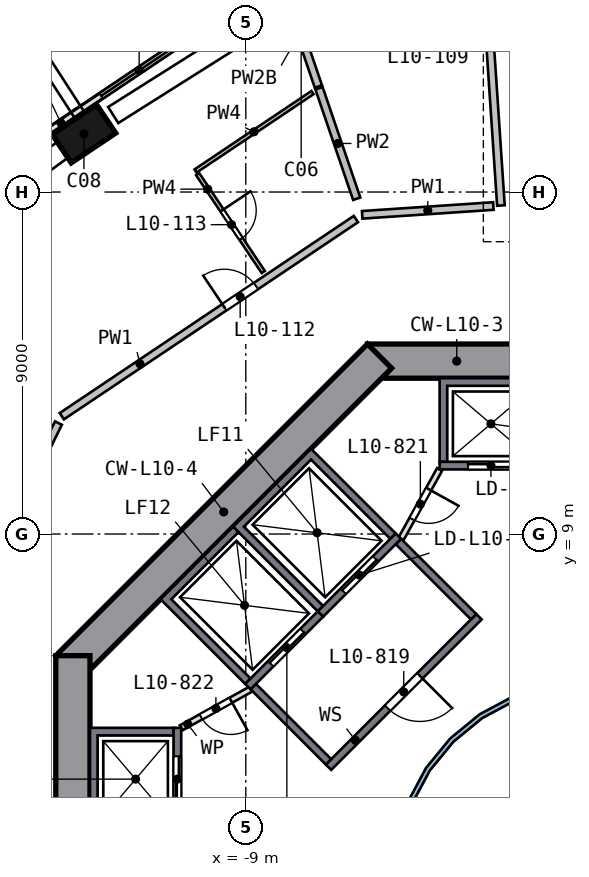
"""IFC4 building model, lengths in metres.
Left out: names, types, materials, properties, quantities, classifications, styles, units other than length and angle.
Written with IfcOpenShell. Run it as: python <this file> out.ifc"""

import sys

from ifc_helpers import new_model, si_unit, direction, frame, frame_2d, origin, origin_2d, place, context, subcontext, project, spatial, polyline, rectangle, outline, extrude, element, fill, save


model = new_model("IFC4")
c1 = context("Model", 3, precision=1e-05, world=origin(), true_north=direction((0.0, 1.0)))
c2 = subcontext(c1, "Body", "Model", "MODEL_VIEW")
j1 = project(units=[si_unit("LENGTHUNIT", "METRE"), si_unit("PLANEANGLEUNIT", "RADIAN")], contexts=[c1])
p1 = place(None, origin())
s1 = spatial("IfcSite", under=j1, at=p1, CompositionType="ELEMENT")
p2 = place(p1, origin())
s2 = spatial("IfcBuilding", under=s1, at=p2, CompositionType="ELEMENT")
p3 = place(p2, frame((0.0, 0.0, 49.5)))
s3 = spatial("IfcBuildingStorey", under=s2, at=p3, CompositionType="ELEMENT", Elevation=49.5)
p4 = place(p3, frame((-13.147, 19.609, 0.0), z_axis=(-0.092706042, -0.063274346, 0.993681009), x_axis=(-0.825459696, -0.553189961, -0.112237059)))
e1 = element("IfcColumn", 1, at=p4, inside=s3, PredefinedType="COLUMN", context=c2, shape_type="SweptSolid", body=[
    extrude(rectangle(XDim=1.4, YDim=0.9, at=origin_2d()), origin(), (0.0, 0.0, 1.0), 3.21),
])
p5 = place(p3, frame((5.799, 13.55, 0.0), z_axis=(0.0, 0.0, 1.0), x_axis=(-1.0, 0.0, 0.0)))
e2 = element("IfcWall", 2, at=p5, inside=s3, PredefinedType="SHEAR", context=c2, shape_type="SweptSolid", body=[
    extrude(rectangle(XDim=11.598, YDim=0.9, at=frame_2d((5.799, 0.0))), origin(), (0.0, 0.0, 1.0), 3.5),
])
p6 = place(p5, frame((4.899, 0.0, 0.0)))
e3 = element("IfcOpeningElement", 3, at=p6, cuts=e2, PredefinedType="OPENING", context=c2, shape_type="SweptSolid", body=[
    extrude(rectangle(XDim=1.8, YDim=2.1, at=frame_2d((0.9, 1.05))), frame((0.0, 0.46, 0.0), z_axis=(0.0, -1.0, 0.0), x_axis=(1.0, 0.0, 0.0)), (0.0, 0.0, 1.0), 0.92),
])
p7 = place(p3, frame((-5.481, 13.682, 0.0), z_axis=(0.0, 0.0, 1.0), x_axis=(-0.707106781, -0.707106781, 0.0)))
e4 = element("IfcWall", 4, at=p7, inside=s3, PredefinedType="SHEAR", context=c2, shape_type="SweptSolid", body=[
    extrude(rectangle(XDim=11.598, YDim=0.9, at=frame_2d((5.799, 0.0))), origin(), (0.0, 0.0, 1.0), 3.5),
])
p8 = place(p3, frame((-13.55, 5.799, 0.0), z_axis=(0.0, 0.0, 1.0), x_axis=(0.0, -1.0, 0.0)))
e5 = element("IfcWall", 5, at=p8, inside=s3, PredefinedType="SHEAR", context=c2, shape_type="SweptSolid", body=[
    extrude(rectangle(XDim=11.598, YDim=0.9, at=frame_2d((5.799, 0.0))), origin(), (0.0, 0.0, 1.0), 3.5),
])
p9 = place(p8, frame((4.899, 0.0, 0.0)))
e6 = element("IfcOpeningElement", 6, at=p9, cuts=e5, PredefinedType="OPENING", context=c2, shape_type="SweptSolid", body=[
    extrude(rectangle(XDim=1.8, YDim=2.1, at=frame_2d((0.9, 1.05))), frame((0.0, 0.46, 0.0), z_axis=(0.0, -1.0, 0.0), x_axis=(1.0, 0.0, 0.0)), (0.0, 0.0, 1.0), 0.92),
])
p10 = place(p3, frame((-10.477, 22.091, 0.0), z_axis=(0.0, 0.0, 1.0), x_axis=(-0.830597136, -0.556873772, 0.0)))
e7 = element("IfcWall", 7, at=p10, inside=s3, PredefinedType="SOLIDWALL", context=c2, shape_type="SweptSolid", body=[
    extrude(rectangle(XDim=3.6, YDim=0.15, at=frame_2d((1.8, 0.0))), origin(), (0.0, 0.0, 1.0), 2.425),
])
p11 = place(p10, frame((0.4, 0.0, 0.0)))
e8 = element("IfcOpeningElement", 8, at=p11, cuts=e7, PredefinedType="OPENING", context=c2, shape_type="SweptSolid", body=[
    extrude(rectangle(XDim=2.4, YDim=2.4, at=frame_2d((1.2, 1.2))), frame((0.0, 0.085, 0.0), z_axis=(0.0, -1.0, 0.0), x_axis=(1.0, 0.0, 0.0)), (0.0, 0.0, 1.0), 0.17),
])
p12 = place(p3, frame((-13.467, 20.087, 0.0), z_axis=(0.0, 0.0, 1.0), x_axis=(-0.830586929, -0.556888995, 0.0)))
e9 = element("IfcWall", 9, at=p12, inside=s3, PredefinedType="SOLIDWALL", context=c2, shape_type="SweptSolid", body=[
    extrude(rectangle(XDim=3.96, YDim=0.15, at=frame_2d((1.98, 0.0))), origin(), (0.0, 0.0, 1.0), 2.425),
])
p13 = place(p12, frame((1.16, 0.0, 0.0)))
e10 = element("IfcOpeningElement", 10, at=p13, cuts=e9, PredefinedType="OPENING", context=c2, shape_type="SweptSolid", body=[
    extrude(rectangle(XDim=2.4, YDim=2.4, at=frame_2d((1.2, 1.2))), frame((0.0, 0.085, 0.0), z_axis=(0.0, -1.0, 0.0), x_axis=(1.0, 0.0, 0.0)), (0.0, 0.0, 1.0), 0.17),
])
p14 = place(p3, frame((-11.287, 25.19, 0.0), z_axis=(0.0, 0.0, 1.0), x_axis=(-0.830599266, -0.556870595, 0.0)))
e11 = element("IfcWall", 11, at=p14, inside=s3, PredefinedType="SOLIDWALL", context=c2, shape_type="SweptSolid", body=[
    extrude(rectangle(XDim=11.152, YDim=0.5, at=frame_2d((5.576, 0.0))), origin(), (0.0, 0.0, 1.0), 0.7),
])
p15 = place(p3, origin())
e12 = element("IfcWall", 12, at=p15, inside=s3, PredefinedType="SOLIDWALL", context=c2, shape_type="SweptSolid", body=[
    extrude(outline(polyline([(-3.9, 10.9), (-3.9, 13.1), (-1.2, 13.1), (-1.2, 10.9), (-1.4, 10.9), (-1.4, 12.9), (-3.7, 12.9), (-3.7, 10.9), (-3.9, 10.9)])), origin(), (0.0, 0.0, 1.0), 3.19),
])
p16 = place(p3, frame((-1.2, 10.8, 0.0), z_axis=(0.0, 0.0, 1.0), x_axis=(-1.0, 0.0, 0.0)))
e13 = element("IfcWall", 13, at=p16, inside=s3, PredefinedType="SOLIDWALL", context=c2, shape_type="SweptSolid", body=[
    extrude(rectangle(XDim=2.7, YDim=0.2, at=frame_2d((1.35, 0.0))), origin(), (0.0, 0.0, 1.0), 3.19),
])
p17 = place(p16, frame((0.75, 0.0, 0.0)))
e14 = element("IfcOpeningElement", 14, at=p17, cuts=e13, PredefinedType="OPENING", context=c2, shape_type="SweptSolid", body=[
    extrude(rectangle(XDim=1.2, YDim=2.1, at=frame_2d((0.6, 1.05))), frame((0.0, 0.11, 0.0), z_axis=(0.0, -1.0, 0.0), x_axis=(1.0, 0.0, 0.0)), (0.0, 0.0, 1.0), 0.22),
])
p18 = place(p3, origin())
e15 = element("IfcWall", 15, at=p18, inside=s3, PredefinedType="SOLIDWALL", context=c2, shape_type="SweptSolid", body=[
    extrude(outline(polyline([(-13.1, 3.9), (-10.9, 3.9), (-10.9, 3.7), (-12.9, 3.7), (-12.9, 1.4), (-10.9, 1.4), (-10.9, 1.2), (-13.1, 1.2), (-13.1, 3.9)])), origin(), (0.0, 0.0, 1.0), 3.19),
])
p19 = place(p3, frame((-10.8, 1.2, 0.0), z_axis=(0.0, 0.0, 1.0), x_axis=(0.0, 1.0, 0.0)))
e16 = element("IfcWall", 16, at=p19, inside=s3, PredefinedType="SOLIDWALL", context=c2, shape_type="SweptSolid", body=[
    extrude(rectangle(XDim=2.7, YDim=0.2, at=frame_2d((1.35, 0.0))), origin(), (0.0, 0.0, 1.0), 3.19),
])
p20 = place(p19, frame((0.75, 0.0, 0.0)))
e17 = element("IfcOpeningElement", 17, at=p20, cuts=e16, PredefinedType="OPENING", context=c2, shape_type="SweptSolid", body=[
    extrude(rectangle(XDim=1.2, YDim=2.1, at=frame_2d((0.6, 1.05))), frame((0.0, 0.11, 0.0), z_axis=(0.0, -1.0, 0.0), x_axis=(1.0, 0.0, 0.0)), (0.0, 0.0, 1.0), 0.22),
])
p21 = place(p3, origin())
e18 = element("IfcWall", 18, at=p21, inside=s3, PredefinedType="SOLIDWALL", context=c2, shape_type="SweptSolid", body=[
    extrude(outline(polyline([(-9.334, 9.192), (-7.283, 11.243), (-5.056, 9.016), (-5.197, 8.874), (-7.283, 10.96), (-9.051, 9.192), (-6.965, 7.106), (-7.106, 6.965), (-9.334, 9.192)])), origin(), (0.0, 0.0, 1.0), 3.19),
])
p22 = place(p3, frame((-4.985, 8.945, 0.0), z_axis=(0.0, 0.0, 1.0), x_axis=(-0.707106781, -0.707106781, 0.0)))
e19 = element("IfcWall", 19, at=p22, inside=s3, PredefinedType="SOLIDWALL", context=c2, shape_type="SweptSolid", body=[
    extrude(rectangle(XDim=2.9, YDim=0.2, at=frame_2d((1.45, 0.0))), origin(), (0.0, 0.0, 1.0), 3.19),
])
p23 = place(p22, frame((0.85, 0.0, 0.0)))
e20 = element("IfcOpeningElement", 20, at=p23, cuts=e19, PredefinedType="OPENING", context=c2, shape_type="SweptSolid", body=[
    extrude(rectangle(XDim=1.2, YDim=2.1, at=frame_2d((0.6, 1.05))), frame((0.0, 0.11, 0.0), z_axis=(0.0, -1.0, 0.0), x_axis=(1.0, 0.0, 0.0)), (0.0, 0.0, 1.0), 0.22),
])
p24 = place(p3, origin())
e21 = element("IfcWall", 21, at=p24, inside=s3, PredefinedType="SOLIDWALL", context=c2, shape_type="SweptSolid", body=[
    extrude(outline(polyline([(-11.243, 7.283), (-9.334, 9.192), (-9.192, 9.051), (-10.96, 7.283), (-8.874, 5.197), (-9.016, 5.056), (-11.243, 7.283)])), origin(), (0.0, 0.0, 1.0), 3.19),
])
p25 = place(p3, frame((-7.036, 6.894, 0.0), z_axis=(0.0, 0.0, 1.0), x_axis=(-0.707106781, -0.707106781, 0.0)))
e22 = element("IfcWall", 22, at=p25, inside=s3, PredefinedType="SOLIDWALL", context=c2, shape_type="SweptSolid", body=[
    extrude(rectangle(XDim=2.7, YDim=0.2, at=frame_2d((1.35, 0.0))), origin(), (0.0, 0.0, 1.0), 3.19),
])
p26 = place(p25, frame((0.65, 0.0, 0.0)))
e23 = element("IfcOpeningElement", 23, at=p26, cuts=e22, PredefinedType="OPENING", context=c2, shape_type="SweptSolid", body=[
    extrude(rectangle(XDim=1.2, YDim=2.1, at=frame_2d((0.6, 1.05))), frame((0.0, 0.11, 0.0), z_axis=(0.0, -1.0, 0.0), x_axis=(1.0, 0.0, 0.0)), (0.0, 0.0, 1.0), 0.22),
])
p27 = place(p3, frame((-2.864, 6.823, 0.0), z_axis=(0.0, 0.0, 1.0), x_axis=(-0.707106781, -0.707106781, 0.0)))
e24 = element("IfcWall", 24, at=p27, inside=s3, PredefinedType="SOLIDWALL", context=c2, shape_type="SweptSolid", body=[
    extrude(rectangle(XDim=5.6, YDim=0.2, at=frame_2d((2.8, 0.0))), origin(), (0.0, 0.0, 1.0), 3.19),
])
p28 = place(p27, frame((2.2, 0.0, 0.0)))
e25 = element("IfcOpeningElement", 25, at=p28, cuts=e24, PredefinedType="OPENING", context=c2, shape_type="SweptSolid", body=[
    extrude(rectangle(XDim=1.2, YDim=2.1, at=frame_2d((0.6, 1.05))), frame((0.0, 0.11, 0.0), z_axis=(0.0, -1.0, 0.0), x_axis=(1.0, 0.0, 0.0)), (0.0, 0.0, 1.0), 0.22),
])
for number, where, z_axis, x_axis in (
    (26, (-3.005, 6.823, 0.0), (0.0, 0.0, 1.0), (-0.707, 0.707, 0.0)),
    (27, (-6.823, 3.005, 0.0), (0.0, 0.0, 1.0), (-0.707, 0.707, 0.0)),
):
    element("IfcWall", number, at=place(p3, frame(where, z_axis=z_axis, x_axis=x_axis)), inside=s3, PredefinedType="SOLIDWALL", context=c2, shape_type="SweptSolid", body=[
        extrude(rectangle(XDim=2.8, YDim=0.2, at=frame_2d((1.4, 0.0))), origin(), (0.0, 0.0, 1.0), 3.19),
    ])
p29 = place(p3, frame((-3.9, 10.7, 0.0), z_axis=(0.0, 0.0, 1.0), x_axis=(-0.485692555, -0.874129705, 0.0)))
e28 = element("IfcWall", 28, at=p29, inside=s3, PredefinedType="PARTITIONING", context=c2, shape_type="SweptSolid", body=[
    extrude(rectangle(XDim=2.089, YDim=0.15, at=frame_2d((1.044, 0.0))), origin(), (0.0, 0.0, 1.0), 3.19),
])
p30 = place(p29, frame((0.594, 0.0, 0.0)))
e29 = element("IfcOpeningElement", 29, at=p30, cuts=e28, PredefinedType="OPENING", context=c2, shape_type="SweptSolid", body=[
    extrude(rectangle(XDim=0.9, YDim=2.1, at=frame_2d((0.45, 1.05))), frame((0.0, 0.085, 0.0), z_axis=(0.0, -1.0, 0.0), x_axis=(1.0, 0.0, 0.0)), (0.0, 0.0, 1.0), 0.17),
])
p31 = place(p3, frame((-8.874, 4.914, 0.0), z_axis=(0.0, 0.0, 1.0), x_axis=(-0.874129705, -0.485692555, 0.0)))
e30 = element("IfcWall", 30, at=p31, inside=s3, PredefinedType="PARTITIONING", context=c2, shape_type="SweptSolid", body=[
    extrude(rectangle(XDim=2.089, YDim=0.15, at=frame_2d((1.044, 0.0))), origin(), (0.0, 0.0, 1.0), 3.19),
])
p32 = place(p31, frame((0.594, 0.0, 0.0)))
e31 = element("IfcOpeningElement", 31, at=p32, cuts=e30, PredefinedType="OPENING", context=c2, shape_type="SweptSolid", body=[
    extrude(rectangle(XDim=0.9, YDim=2.1, at=frame_2d((0.45, 1.05))), frame((0.0, 0.085, 0.0), z_axis=(0.0, -1.0, 0.0), x_axis=(1.0, 0.0, 0.0)), (0.0, 0.0, 1.0), 0.17),
])
p33 = place(p3, origin())
e32 = element("IfcWall", 32, at=p33, inside=s3, PredefinedType="SOLIDWALL", context=c2, shape_type="SweptSolid", body=[
    extrude(outline(polyline([(5.021, -0.999), (4.73, -1.959), (4.257, -2.844), (3.62, -3.62), (2.844, -4.257), (1.959, -4.73), (0.999, -5.021), (0.0, -5.12), (-0.999, -5.021), (-1.959, -4.73), (-2.844, -4.257), (-3.62, -3.62), (-4.257, -2.844), (-4.73, -1.959), (-5.021, -0.999), (-5.12, 0.0), (-5.021, 0.999), (-4.73, 1.959), (-4.257, 2.844), (-3.62, 3.62), (-2.844, 4.257), (-1.959, 4.73), (-0.999, 5.021), (0.0, 5.12), (0.999, 5.021), (1.959, 4.73), (2.844, 4.257), (3.62, 3.62), (4.257, 2.844), (4.73, 1.959), (5.021, 0.999), (5.12, 0.0), (5.021, -0.999)]), holes=[polyline([(4.904, 0.976), (4.619, 1.913), (4.157, 2.778), (3.535, 3.535), (2.778, 4.157), (1.913, 4.619), (0.976, 4.904), (0.0, 5.0), (-0.976, 4.904), (-1.913, 4.619), (-2.778, 4.157), (-3.535, 3.535), (-4.157, 2.778), (-4.619, 1.913), (-4.904, 0.976), (-5.0, 0.0), (-4.904, -0.976), (-4.619, -1.913), (-4.157, -2.778), (-3.535, -3.535), (-2.778, -4.157), (-1.913, -4.619), (-0.976, -4.904), (0.0, -5.0), (0.976, -4.904), (1.913, -4.619), (2.778, -4.157), (3.535, -3.535), (4.157, -2.778), (4.619, -1.913), (4.904, -0.976), (5.0, 0.0), (4.904, 0.976)])]), origin(), (0.0, 0.0, 1.0), 3.19),
])
p34 = place(p3, frame((-17.949, 3.738, 0.0), z_axis=(0.0, 0.0, 1.0), x_axis=(0.440892524, 0.897559905, 0.0)))
e33 = element("IfcWall", 33, at=p34, inside=s3, PredefinedType="SOLIDWALL", context=c2, shape_type="SweptSolid", body=[
    extrude(rectangle(XDim=9.116, YDim=0.2, at=frame_2d((4.558, 0.0))), origin(), (0.0, 0.0, 1.0), 3.19),
])
p35 = place(p34, frame((0.2, 0.0, 0.0)))
e34 = element("IfcOpeningElement", 34, at=p35, cuts=e33, PredefinedType="OPENING", context=c2, shape_type="SweptSolid", body=[
    extrude(rectangle(XDim=1.0, YDim=2.1, at=frame_2d((0.5, 1.05))), frame((0.0, 0.11, 0.0), z_axis=(0.0, -1.0, 0.0), x_axis=(1.0, 0.0, 0.0)), (0.0, 0.0, 1.0), 0.22),
])
p36 = place(p3, frame((-13.841, 12.101, 0.0), z_axis=(0.0, 0.0, 1.0), x_axis=(0.830608164, 0.556857323, 0.0)))
e35 = element("IfcWall", 35, at=p36, inside=s3, PredefinedType="SOLIDWALL", context=c2, shape_type="SweptSolid", body=[
    extrude(rectangle(XDim=9.316, YDim=0.2, at=frame_2d((4.658, 0.0))), origin(), (0.0, 0.0, 1.0), 3.19),
])
p37 = place(p36, frame((5.15, 0.0, 0.0)))
e36 = element("IfcOpeningElement", 36, at=p37, cuts=e35, PredefinedType="OPENING", context=c2, shape_type="SweptSolid", body=[
    extrude(rectangle(XDim=1.0, YDim=2.1, at=frame_2d((0.5, 1.05))), frame((0.0, 0.11, 0.0), z_axis=(0.0, -1.0, 0.0), x_axis=(1.0, 0.0, 0.0)), (0.0, 0.0, 1.0), 0.22),
])
p38 = place(p3, frame((-2.486, 17.631, 0.0), z_axis=(0.0, 0.0, 1.0), x_axis=(-0.997758214, -0.066921946, 0.0)))
e37 = element("IfcWall", 37, at=p38, inside=s3, PredefinedType="SOLIDWALL", context=c2, shape_type="SweptSolid", body=[
    extrude(rectangle(XDim=3.458, YDim=0.2, at=frame_2d((1.729, 0.0))), origin(), (0.0, 0.0, 1.0), 3.19),
])
p39 = place(p3, frame((-2.287, 17.645, 0.0), z_axis=(0.0, 0.0, 1.0), x_axis=(-0.066974116, 0.997754713, 0.0)))
e38 = element("IfcWall", 38, at=p39, inside=s3, PredefinedType="SOLIDWALL", context=c2, shape_type="SweptSolid", body=[
    extrude(rectangle(XDim=23.25, YDim=0.2, at=frame_2d((11.625, 0.0))), origin(), (0.0, 0.0, 1.0), 3.19),
])
p40 = place(p39, frame((4.95, 0.0, 0.0)))
e39 = element("IfcOpeningElement", 39, at=p40, cuts=e38, PredefinedType="OPENING", context=c2, shape_type="SweptSolid", body=[
    extrude(rectangle(XDim=1.0, YDim=2.1, at=frame_2d((0.5, 1.05))), frame((0.0, 0.11, 0.0), z_axis=(0.0, -1.0, 0.0), x_axis=(1.0, 0.0, 0.0)), (0.0, 0.0, 1.0), 0.22),
])
p41 = place(p3, frame((-7.089, 20.777, 0.0), z_axis=(0.0, 0.0, 1.0), x_axis=(-0.322908317, 0.946430251, 0.0)))
e40 = element("IfcWall", 40, at=p41, inside=s3, PredefinedType="SOLIDWALL", context=c2, shape_type="SweptSolid", body=[
    extrude(rectangle(XDim=3.011, YDim=0.2, at=frame_2d((1.506, 0.0))), origin(), (0.0, 0.0, 1.0), 2.69),
])
p42 = place(p3, frame((-6.081, 17.823, 0.0), z_axis=(0.0, 0.0, 1.0), x_axis=(-0.322937445, 0.946420312, 0.0)))
e41 = element("IfcWall", 41, at=p42, inside=s3, PredefinedType="SOLIDWALL", context=c2, shape_type="SweptSolid", body=[
    extrude(rectangle(XDim=3.075, YDim=0.2, at=frame_2d((1.537, 0.0))), origin(), (0.0, 0.0, 1.0), 3.19),
])
p43 = place(p3, frame((-10.266, 18.47, 0.0), z_axis=(0.0, 0.0, 1.0), x_axis=(0.556860995, -0.830605702, 0.0)))
e42 = element("IfcWall", 42, at=p43, inside=s3, PredefinedType="PARTITIONING", context=c2, shape_type="SweptSolid", body=[
    extrude(rectangle(XDim=3.1, YDim=0.1, at=frame_2d((1.55, 0.0))), origin(), (0.0, 0.0, 1.0), 3.19),
])
p44 = place(p43, frame((1.15, 0.0, 0.0)))
e43 = element("IfcOpeningElement", 43, at=p44, cuts=e42, PredefinedType="OPENING", context=c2, shape_type="SweptSolid", body=[
    extrude(rectangle(XDim=0.9, YDim=2.1, at=frame_2d((0.45, 1.05))), frame((0.0, 0.06, 0.0), z_axis=(0.0, -1.0, 0.0), x_axis=(1.0, 0.0, 0.0)), (0.0, 0.0, 1.0), 0.12),
])
p45 = place(p3, frame((-10.322, 18.553, 0.0), z_axis=(0.0, 0.0, 1.0), x_axis=(0.83060748, 0.556858344, 0.0)))
e44 = element("IfcWall", 44, at=p45, inside=s3, PredefinedType="PARTITIONING", context=c2, shape_type="SweptSolid", body=[
    extrude(rectangle(XDim=3.704, YDim=0.1, at=frame_2d((1.852, 0.0))), origin(), (0.0, 0.0, 1.0), 3.19),
])
p46 = place(p11, origin())
e45 = element("IfcDoor", 45, at=p46, inside=s3, OperationType="SLIDING_TO_RIGHT", PredefinedType="DOOR", context=c2, shape_type="SweptSolid", body=[
    extrude(rectangle(XDim=2.4, YDim=2.4, at=frame_2d((1.2, 1.2))), frame((0.0, 0.025, 0.0), z_axis=(0.0, -1.0, 0.0), x_axis=(1.0, 0.0, 0.0)), (0.0, 0.0, 1.0), 0.05),
])
fill(e8, e45)
p47 = place(p17, origin())
e46 = element("IfcDoor", 46, at=p47, inside=s3, OperationType="DOUBLE_DOOR_SLIDING", PredefinedType="DOOR", context=c2, shape_type="SweptSolid", body=[
    extrude(rectangle(XDim=1.2, YDim=2.1, at=frame_2d((0.6, 1.05))), frame((0.0, 0.025, 0.0), z_axis=(0.0, -1.0, 0.0), x_axis=(1.0, 0.0, 0.0)), (0.0, 0.0, 1.0), 0.05),
])
fill(e14, e46)
p48 = place(p20, origin())
e47 = element("IfcDoor", 47, at=p48, inside=s3, OperationType="DOUBLE_DOOR_SLIDING", PredefinedType="DOOR", context=c2, shape_type="SweptSolid", body=[
    extrude(rectangle(XDim=1.2, YDim=2.1, at=frame_2d((0.6, 1.05))), frame((0.0, 0.025, 0.0), z_axis=(0.0, -1.0, 0.0), x_axis=(1.0, 0.0, 0.0)), (0.0, 0.0, 1.0), 0.05),
])
fill(e17, e47)
p49 = place(p23, origin())
e48 = element("IfcDoor", 48, at=p49, inside=s3, OperationType="DOUBLE_DOOR_SLIDING", PredefinedType="DOOR", context=c2, shape_type="SweptSolid", body=[
    extrude(rectangle(XDim=1.2, YDim=2.1, at=frame_2d((0.6, 1.05))), frame((0.0, 0.025, 0.0), z_axis=(0.0, -1.0, 0.0), x_axis=(1.0, 0.0, 0.0)), (0.0, 0.0, 1.0), 0.05),
])
fill(e20, e48)
p50 = place(p26, origin())
e49 = element("IfcDoor", 49, at=p50, inside=s3, OperationType="DOUBLE_DOOR_SLIDING", PredefinedType="DOOR", context=c2, shape_type="SweptSolid", body=[
    extrude(rectangle(XDim=1.2, YDim=2.1, at=frame_2d((0.6, 1.05))), frame((0.0, 0.025, 0.0), z_axis=(0.0, -1.0, 0.0), x_axis=(1.0, 0.0, 0.0)), (0.0, 0.0, 1.0), 0.05),
])
fill(e23, e49)
p51 = place(p28, origin())
e50 = element("IfcDoor", 50, at=p51, inside=s3, OperationType="SINGLE_SWING_LEFT", PredefinedType="DOOR", context=c2, shape_type="SweptSolid", body=[
    extrude(rectangle(XDim=1.2, YDim=2.1, at=frame_2d((0.6, 1.05))), frame((0.0, 0.025, 0.0), z_axis=(0.0, -1.0, 0.0), x_axis=(1.0, 0.0, 0.0)), (0.0, 0.0, 1.0), 0.05),
])
fill(e25, e50)
p52 = place(p30, origin())
e51 = element("IfcDoor", 51, at=p52, inside=s3, OperationType="SINGLE_SWING_LEFT", PredefinedType="DOOR", context=c2, shape_type="SweptSolid", body=[
    extrude(rectangle(XDim=0.9, YDim=2.1, at=frame_2d((0.45, 1.05))), frame((0.0, 0.025, 0.0), z_axis=(0.0, -1.0, 0.0), x_axis=(1.0, 0.0, 0.0)), (0.0, 0.0, 1.0), 0.05),
])
fill(e29, e51)
p53 = place(p32, origin())
e52 = element("IfcDoor", 52, at=p53, inside=s3, OperationType="SINGLE_SWING_LEFT", PredefinedType="DOOR", context=c2, shape_type="SweptSolid", body=[
    extrude(rectangle(XDim=0.9, YDim=2.1, at=frame_2d((0.45, 1.05))), frame((0.0, 0.025, 0.0), z_axis=(0.0, -1.0, 0.0), x_axis=(1.0, 0.0, 0.0)), (0.0, 0.0, 1.0), 0.05),
])
fill(e31, e52)
p54 = place(p37, origin())
e53 = element("IfcDoor", 53, at=p54, inside=s3, OperationType="SINGLE_SWING_LEFT", PredefinedType="DOOR", context=c2, shape_type="SweptSolid", body=[
    extrude(rectangle(XDim=1.0, YDim=2.1, at=frame_2d((0.5, 1.05))), frame((0.0, 0.025, 0.0), z_axis=(0.0, -1.0, 0.0), x_axis=(1.0, 0.0, 0.0)), (0.0, 0.0, 1.0), 0.05),
])
fill(e36, e53)
p55 = place(p44, origin())
e54 = element("IfcDoor", 54, at=p55, inside=s3, OperationType="SINGLE_SWING_LEFT", PredefinedType="DOOR", context=c2, shape_type="SweptSolid", body=[
    extrude(rectangle(XDim=0.9, YDim=2.1, at=frame_2d((0.45, 1.05))), frame((0.0, 0.025, 0.0), z_axis=(0.0, -1.0, 0.0), x_axis=(1.0, 0.0, 0.0)), (0.0, 0.0, 1.0), 0.05),
])
fill(e43, e54)
save(model, sys.argv[1])
